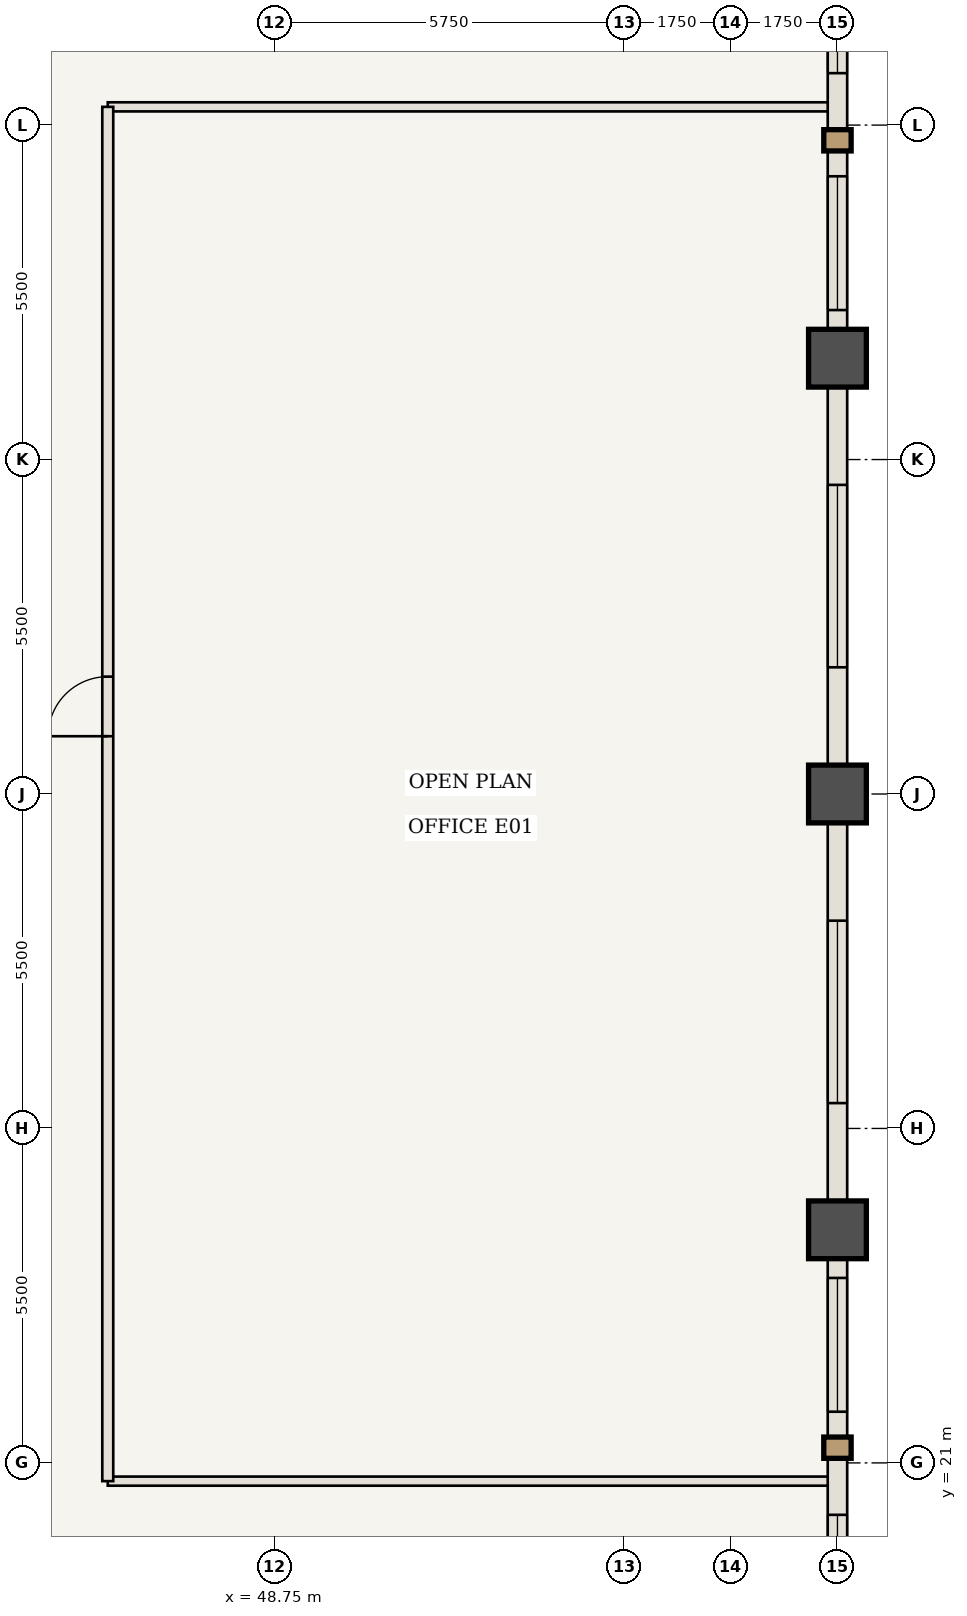
"""IFC4 building model, lengths in metres.
Left out: names, types, materials, properties, quantities, classifications, styles, units other than length and angle.
Written with IfcOpenShell. Run it as: python <this file> out.ifc"""

import sys

from ifc_helpers import new_model, si_unit, direction, frame, frame_2d, origin, origin_2d, place, context, subcontext, project, spatial, rectangle, extrude, element, fill, save


model = new_model("IFC4")
c1 = context("Model", 3, precision=1e-05, world=origin(), true_north=direction((0.0, 1.0)))
c2 = subcontext(c1, "Body", "Model", "MODEL_VIEW")
j1 = project(units=[si_unit("LENGTHUNIT", "METRE"), si_unit("PLANEANGLEUNIT", "RADIAN")], contexts=[c1])
p1 = place(None, origin())
s1 = spatial("IfcSite", under=j1, at=p1, CompositionType="ELEMENT")
p2 = place(p1, origin())
s2 = spatial("IfcBuilding", under=s1, at=p2, CompositionType="ELEMENT")
p3 = place(p2, frame((0.0, 0.0, 129.85)))
s3 = spatial("IfcBuildingStorey", under=s2, at=p3, CompositionType="ELEMENT", Elevation=129.85)
for number, where, z_axis, x_axis in (
    (1, (58.0, 24.833, 0.0), (0.0, 0.0, 1.0), (1.0, 0.0, 0.0)),
    (2, (58.0, 32.0, 0.0), (0.0, 0.0, 1.0), (1.0, 0.0, 0.0)),
    (3, (58.0, 39.167, 0.0), (0.0, 0.0, 1.0), (1.0, 0.0, 0.0)),
):
    element("IfcColumn", number, at=place(p3, frame(where, z_axis=z_axis, x_axis=x_axis)), inside=s3, PredefinedType="COLUMN", context=c2, shape_type="SweptSolid", body=[
        extrude(rectangle(XDim=0.95, YDim=0.95, at=origin_2d()), origin(), (0.0, 0.0, 1.0), 3.85),
    ])
for number, where, z_axis, x_axis in (
    (4, (46.0, 20.7, 0.0), (0.0, 0.0, 1.0), (1.0, 0.0, 0.0)),
    (5, (46.0, 43.3, 0.0), (0.0, 0.0, 1.0), (1.0, 0.0, 0.0)),
):
    element("IfcWall", number, at=place(p3, frame(where, z_axis=z_axis, x_axis=x_axis)), inside=s3, PredefinedType="STANDARD", context=c2, shape_type="SweptSolid", body=[
        extrude(rectangle(XDim=11.94, YDim=0.15, at=frame_2d((5.97, 0.0))), origin(), (0.0, 0.0, 1.0), 3.065),
    ])
p4 = place(p3, frame((46.0, 20.7, 0.0), z_axis=(0.0, 0.0, 1.0), x_axis=(0.0, 1.0, 0.0)))
e6 = element("IfcWall", 6, at=p4, inside=s3, PredefinedType="STANDARD", context=c2, shape_type="SweptSolid", body=[
    extrude(rectangle(XDim=22.6, YDim=0.18, at=frame_2d((11.3, 0.0))), origin(), (0.0, 0.0, 1.0), 3.685),
])
p5 = place(p4, frame((12.25, 0.0, 0.0)))
e7 = element("IfcOpeningElement", 7, at=p5, cuts=e6, PredefinedType="OPENING", context=c2, shape_type="SweptSolid", body=[
    extrude(rectangle(XDim=0.98, YDim=2.2, at=frame_2d((0.49, 1.1))), frame((0.0, 0.1, 0.0), z_axis=(0.0, -1.0, 0.0), x_axis=(1.0, 0.0, 0.0)), (0.0, 0.0, 1.0), 0.2),
])
p6 = place(p3, frame((58.0, 24.833, 0.0), z_axis=(0.0, 0.0, 1.0), x_axis=(0.0, -1.0, 0.0)))
e8 = element("IfcWall", 8, at=p6, inside=s3, PredefinedType="USERDEFINED", context=c2, shape_type="SweptSolid", body=[
    extrude(rectangle(XDim=7.167, YDim=0.32, at=frame_2d((3.583, 0.0))), origin(), (0.0, 0.0, 1.0), 2.885),
])
p7 = place(p6, frame((0.792, 0.0, 0.85)))
e9 = element("IfcOpeningElement", 9, at=p7, cuts=e8, PredefinedType="OPENING", context=c2, shape_type="SweptSolid", body=[
    extrude(rectangle(XDim=2.2, YDim=1.835, at=frame_2d((1.1, 0.917))), frame((0.0, 0.17, 0.0), z_axis=(0.0, -1.0, 0.0), x_axis=(1.0, 0.0, 0.0)), (0.0, 0.0, 1.0), 0.34),
])
p8 = place(p6, frame((4.688, 0.0, 0.85)))
e10 = element("IfcOpeningElement", 10, at=p8, cuts=e8, PredefinedType="OPENING", context=c2, shape_type="SweptSolid", body=[
    extrude(rectangle(XDim=1.6, YDim=1.835, at=frame_2d((0.8, 0.917))), frame((0.0, 0.17, 0.0), z_axis=(0.0, -1.0, 0.0), x_axis=(1.0, 0.0, 0.0)), (0.0, 0.0, 1.0), 0.34),
])
p9 = place(p3, frame((58.0, 32.0, 0.0), z_axis=(0.0, 0.0, 1.0), x_axis=(0.0, -1.0, 0.0)))
e11 = element("IfcWall", 11, at=p9, inside=s3, PredefinedType="USERDEFINED", context=c2, shape_type="SweptSolid", body=[
    extrude(rectangle(XDim=7.167, YDim=0.32, at=frame_2d((3.583, 0.0))), origin(), (0.0, 0.0, 1.0), 2.885),
])
p10 = place(p9, frame((2.083, 0.0, 0.85)))
e12 = element("IfcOpeningElement", 12, at=p10, cuts=e11, PredefinedType="OPENING", context=c2, shape_type="SweptSolid", body=[
    extrude(rectangle(XDim=3.0, YDim=1.835, at=frame_2d((1.5, 0.917))), frame((0.0, 0.17, 0.0), z_axis=(0.0, -1.0, 0.0), x_axis=(1.0, 0.0, 0.0)), (0.0, 0.0, 1.0), 0.34),
])
p11 = place(p3, frame((58.0, 39.167, 0.0), z_axis=(0.0, 0.0, 1.0), x_axis=(0.0, -1.0, 0.0)))
e13 = element("IfcWall", 13, at=p11, inside=s3, PredefinedType="USERDEFINED", context=c2, shape_type="SweptSolid", body=[
    extrude(rectangle(XDim=7.167, YDim=0.32, at=frame_2d((3.583, 0.0))), origin(), (0.0, 0.0, 1.0), 2.885),
])
p12 = place(p11, frame((2.083, 0.0, 0.85)))
e14 = element("IfcOpeningElement", 14, at=p12, cuts=e13, PredefinedType="OPENING", context=c2, shape_type="SweptSolid", body=[
    extrude(rectangle(XDim=3.0, YDim=1.835, at=frame_2d((1.5, 0.917))), frame((0.0, 0.17, 0.0), z_axis=(0.0, -1.0, 0.0), x_axis=(1.0, 0.0, 0.0)), (0.0, 0.0, 1.0), 0.34),
])
p13 = place(p3, frame((58.0, 46.333, 0.0), z_axis=(0.0, 0.0, 1.0), x_axis=(0.0, -1.0, 0.0)))
e15 = element("IfcWall", 15, at=p13, inside=s3, PredefinedType="USERDEFINED", context=c2, shape_type="SweptSolid", body=[
    extrude(rectangle(XDim=7.167, YDim=0.32, at=frame_2d((3.583, 0.0))), origin(), (0.0, 0.0, 1.0), 2.885),
])
p14 = place(p13, frame((0.879, 0.0, 0.85)))
e16 = element("IfcOpeningElement", 16, at=p14, cuts=e15, PredefinedType="OPENING", context=c2, shape_type="SweptSolid", body=[
    extrude(rectangle(XDim=1.6, YDim=1.835, at=frame_2d((0.8, 0.917))), frame((0.0, 0.17, 0.0), z_axis=(0.0, -1.0, 0.0), x_axis=(1.0, 0.0, 0.0)), (0.0, 0.0, 1.0), 0.34),
])
p15 = place(p13, frame((4.175, 0.0, 0.85)))
e17 = element("IfcOpeningElement", 17, at=p15, cuts=e15, PredefinedType="OPENING", context=c2, shape_type="SweptSolid", body=[
    extrude(rectangle(XDim=2.2, YDim=1.835, at=frame_2d((1.1, 0.917))), frame((0.0, 0.17, 0.0), z_axis=(0.0, -1.0, 0.0), x_axis=(1.0, 0.0, 0.0)), (0.0, 0.0, 1.0), 0.34),
])
p16 = place(p5, origin())
e18 = element("IfcDoor", 18, at=p16, inside=s3, OperationType="SINGLE_SWING_LEFT", PredefinedType="DOOR", context=c2, shape_type="SweptSolid", body=[
    extrude(rectangle(XDim=0.98, YDim=2.2, at=frame_2d((0.49, 1.1))), frame((0.0, 0.025, 0.0), z_axis=(0.0, -1.0, 0.0), x_axis=(1.0, 0.0, 0.0)), (0.0, 0.0, 1.0), 0.05),
])
fill(e7, e18)
p17 = place(p7, origin())
e19 = element("IfcWindow", 19, at=p17, inside=s3, PartitioningType="SINGLE_PANEL", PredefinedType="WINDOW", context=c2, shape_type="SweptSolid", body=[
    extrude(rectangle(XDim=2.2, YDim=1.835, at=frame_2d((1.1, 0.917))), frame((0.0, 0.03, 0.0), z_axis=(0.0, -1.0, 0.0), x_axis=(1.0, 0.0, 0.0)), (0.0, 0.0, 1.0), 0.06),
])
fill(e9, e19)
p18 = place(p8, origin())
e20 = element("IfcWindow", 20, at=p18, inside=s3, PartitioningType="SINGLE_PANEL", PredefinedType="WINDOW", context=c2, shape_type="SweptSolid", body=[
    extrude(rectangle(XDim=1.6, YDim=1.835, at=frame_2d((0.8, 0.917))), frame((0.0, 0.03, 0.0), z_axis=(0.0, -1.0, 0.0), x_axis=(1.0, 0.0, 0.0)), (0.0, 0.0, 1.0), 0.06),
])
fill(e10, e20)
p19 = place(p10, origin())
e21 = element("IfcWindow", 21, at=p19, inside=s3, PartitioningType="SINGLE_PANEL", PredefinedType="WINDOW", context=c2, shape_type="SweptSolid", body=[
    extrude(rectangle(XDim=3.0, YDim=1.835, at=frame_2d((1.5, 0.917))), frame((0.0, 0.03, 0.0), z_axis=(0.0, -1.0, 0.0), x_axis=(1.0, 0.0, 0.0)), (0.0, 0.0, 1.0), 0.06),
])
fill(e12, e21)
p20 = place(p12, origin())
e22 = element("IfcWindow", 22, at=p20, inside=s3, PartitioningType="SINGLE_PANEL", PredefinedType="WINDOW", context=c2, shape_type="SweptSolid", body=[
    extrude(rectangle(XDim=3.0, YDim=1.835, at=frame_2d((1.5, 0.917))), frame((0.0, 0.03, 0.0), z_axis=(0.0, -1.0, 0.0), x_axis=(1.0, 0.0, 0.0)), (0.0, 0.0, 1.0), 0.06),
])
fill(e14, e22)
p21 = place(p14, origin())
e23 = element("IfcWindow", 23, at=p21, inside=s3, PartitioningType="SINGLE_PANEL", PredefinedType="WINDOW", context=c2, shape_type="SweptSolid", body=[
    extrude(rectangle(XDim=1.6, YDim=1.835, at=frame_2d((0.8, 0.917))), frame((0.0, 0.03, 0.0), z_axis=(0.0, -1.0, 0.0), x_axis=(1.0, 0.0, 0.0)), (0.0, 0.0, 1.0), 0.06),
])
fill(e16, e23)
p22 = place(p15, origin())
e24 = element("IfcWindow", 24, at=p22, inside=s3, PartitioningType="SINGLE_PANEL", PredefinedType="WINDOW", context=c2, shape_type="SweptSolid", body=[
    extrude(rectangle(XDim=2.2, YDim=1.835, at=frame_2d((1.1, 0.917))), frame((0.0, 0.03, 0.0), z_axis=(0.0, -1.0, 0.0), x_axis=(1.0, 0.0, 0.0)), (0.0, 0.0, 1.0), 0.06),
])
fill(e17, e24)
save(model, sys.argv[1])
